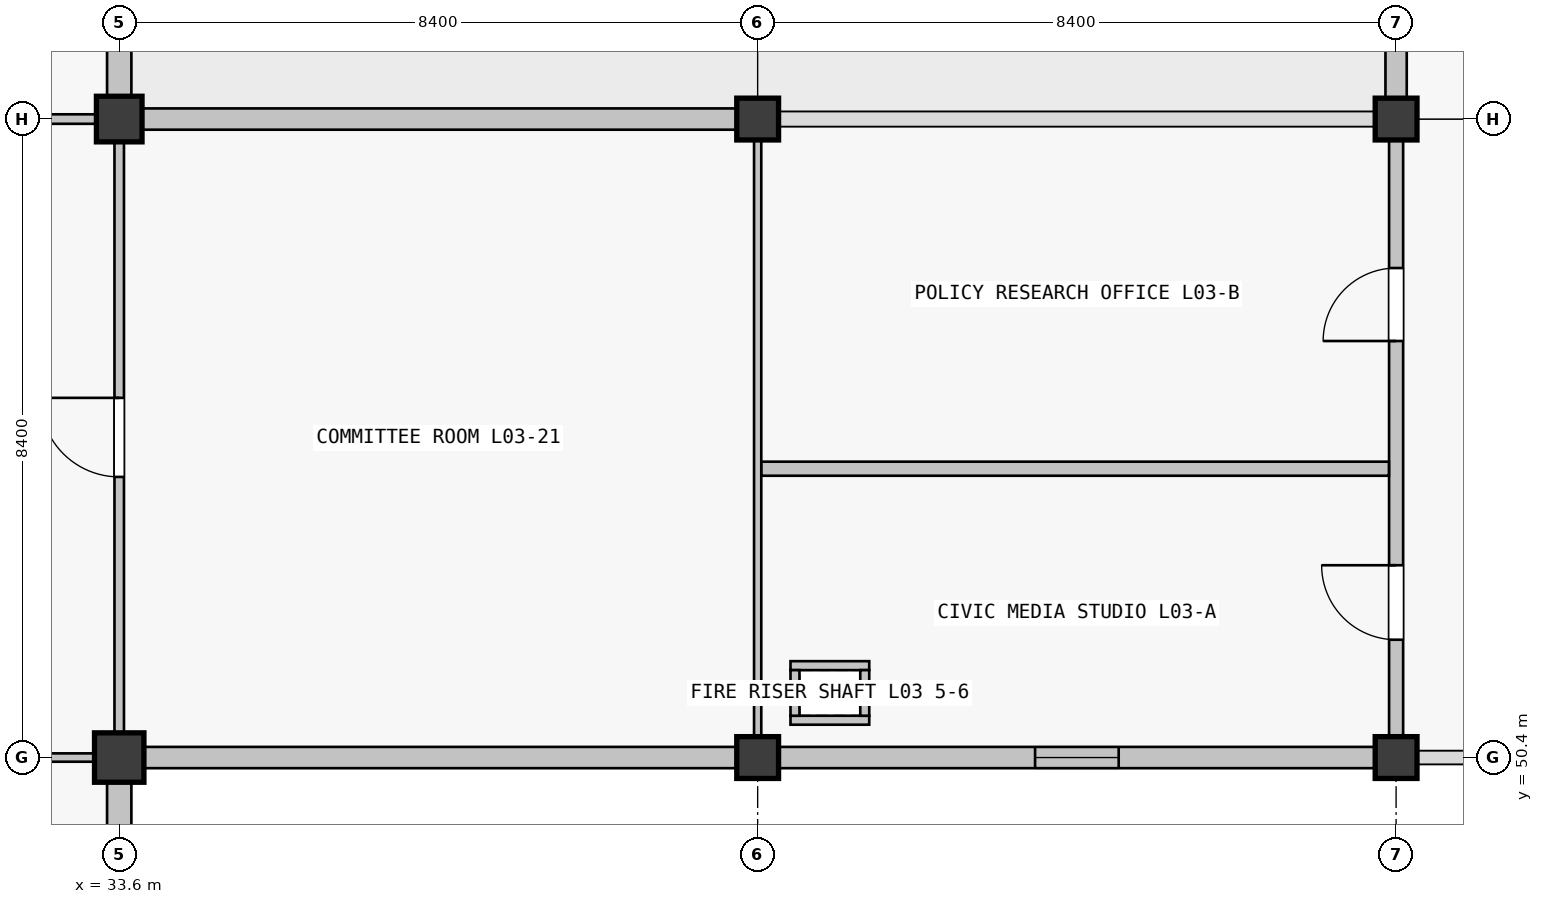
"""IFC4 building model, lengths in metres.
Left out: names, types, materials, properties, quantities, classifications, styles, units other than length and angle.
Written with IfcOpenShell. Run it as: python <this file> out.ifc"""

import sys

from ifc_helpers import new_model, si_unit, direction, frame, frame_2d, origin, origin_2d, place, context, subcontext, project, spatial, rectangle, extrude, element, fill, save


model = new_model("IFC4")
c1 = context("Model", 3, precision=1e-05, world=origin(), true_north=direction((0.0, 1.0)))
c2 = subcontext(c1, "Body", "Model", "MODEL_VIEW")
j1 = project(units=[si_unit("LENGTHUNIT", "METRE"), si_unit("PLANEANGLEUNIT", "RADIAN")], contexts=[c1])
p1 = place(None, origin())
s1 = spatial("IfcSite", under=j1, at=p1, CompositionType="ELEMENT")
p2 = place(p1, origin())
s2 = spatial("IfcBuilding", under=s1, at=p2, CompositionType="ELEMENT")
p3 = place(p2, frame((0.0, 0.0, 14.76)))
s3 = spatial("IfcBuildingStorey", under=s2, at=p3, CompositionType="ELEMENT", Elevation=14.76)
p4 = place(p3, frame((33.6, 50.4, 0.0), z_axis=(0.0, 0.0, 1.0), x_axis=(1.0, 0.0, 0.0)))
e1 = element("IfcColumn", 1, at=p4, inside=s3, PredefinedType="COLUMN", context=c2, shape_type="SweptSolid", body=[
    extrude(rectangle(XDim=0.65, YDim=0.65, at=origin_2d()), origin(), (0.0, 0.0, 1.0), 4.32),
])
p5 = place(p3, frame((33.6, 58.8, 0.0), z_axis=(0.0, 0.0, 1.0), x_axis=(1.0, 0.0, 0.0)))
e2 = element("IfcColumn", 2, at=p5, inside=s3, PredefinedType="COLUMN", context=c2, shape_type="SweptSolid", body=[
    extrude(rectangle(XDim=0.6, YDim=0.6, at=origin_2d()), origin(), (0.0, 0.0, 1.0), 4.32),
])
for number, where, z_axis, x_axis in (
    (3, (42.0, 50.4, 0.0), (0.0, 0.0, 1.0), (1.0, 0.0, 0.0)),
    (4, (42.0, 58.8, 0.0), (0.0, 0.0, 1.0), (1.0, 0.0, 0.0)),
    (5, (50.4, 50.4, 0.0), (0.0, 0.0, 1.0), (1.0, 0.0, 0.0)),
    (6, (50.4, 58.8, 0.0), (0.0, 0.0, 1.0), (1.0, 0.0, 0.0)),
):
    element("IfcColumn", number, at=place(p3, frame(where, z_axis=z_axis, x_axis=x_axis)), inside=s3, PredefinedType="COLUMN", context=c2, shape_type="SweptSolid", body=[
        extrude(rectangle(XDim=0.55, YDim=0.55, at=origin_2d()), origin(), (0.0, 0.0, 1.0), 4.07),
    ])
p6 = place(p3, frame((33.6, 50.074, 0.0), z_axis=(0.0, 0.0, 1.0), x_axis=(0.0, -1.0, 0.0)))
e7 = element("IfcWall", 7, at=p6, inside=s3, PredefinedType="SOLIDWALL", context=c2, shape_type="SweptSolid", body=[
    extrude(rectangle(XDim=7.773, YDim=0.32, at=frame_2d((3.886, 0.0))), origin(), (0.0, 0.0, 1.0), 3.37),
])
p7 = place(p6, frame((3.186, 0.0, 0.9)))
e8 = element("IfcOpeningElement", 8, at=p7, cuts=e7, PredefinedType="OPENING", context=c2, shape_type="SweptSolid", body=[
    extrude(rectangle(XDim=1.4, YDim=1.75, at=frame_2d((0.7, 0.875))), frame((0.0, 0.16, 0.0), z_axis=(0.0, -1.0, 0.0), x_axis=(1.0, 0.0, 0.0)), (0.0, 0.0, 1.0), 0.32),
])
p8 = place(p3, frame((33.6, 66.874, 0.0), z_axis=(0.0, 0.0, 1.0), x_axis=(0.0, -1.0, 0.0)))
e9 = element("IfcWall", 9, at=p8, inside=s3, PredefinedType="SOLIDWALL", context=c2, shape_type="SweptSolid", body=[
    extrude(rectangle(XDim=7.773, YDim=0.32, at=frame_2d((3.886, 0.0))), origin(), (0.0, 0.0, 1.0), 3.37),
])
p9 = place(p8, frame((2.286, 0.0, 0.9)))
e10 = element("IfcOpeningElement", 10, at=p9, cuts=e9, PredefinedType="OPENING", context=c2, shape_type="SweptSolid", body=[
    extrude(rectangle(XDim=3.2, YDim=1.75, at=frame_2d((1.6, 0.875))), frame((0.0, 0.16, 0.0), z_axis=(0.0, -1.0, 0.0), x_axis=(1.0, 0.0, 0.0)), (0.0, 0.0, 1.0), 0.32),
])
p10 = place(p3, frame((41.724, 50.4, 0.0), z_axis=(0.0, 0.0, 1.0), x_axis=(-1.0, 0.0, 0.0)))
e11 = element("IfcWall", 11, at=p10, inside=s3, PredefinedType="SOLIDWALL", context=c2, shape_type="SweptSolid", body=[
    extrude(rectangle(XDim=7.798, YDim=0.28, at=frame_2d((3.899, 0.0))), origin(), (0.0, 0.0, 1.0), 3.37),
])
p11 = place(p3, frame((33.901, 58.8, 0.0), z_axis=(0.0, 0.0, 1.0), x_axis=(1.0, 0.0, 0.0)))
e12 = element("IfcWall", 12, at=p11, inside=s3, PredefinedType="SOLIDWALL", context=c2, shape_type="SweptSolid", body=[
    extrude(rectangle(XDim=7.823, YDim=0.28, at=frame_2d((3.912, 0.0))), origin(), (0.0, 0.0, 1.0), 3.37),
])
p12 = place(p3, frame((50.124, 50.4, 0.0), z_axis=(0.0, 0.0, 1.0), x_axis=(-1.0, 0.0, 0.0)))
e13 = element("IfcWall", 13, at=p12, inside=s3, PredefinedType="SOLIDWALL", context=c2, shape_type="SweptSolid", body=[
    extrude(rectangle(XDim=7.848, YDim=0.28, at=frame_2d((3.924, 0.0))), origin(), (0.0, 0.0, 1.0), 3.37),
])
p13 = place(p12, frame((3.374, 0.0, 0.9)))
e14 = element("IfcOpeningElement", 14, at=p13, cuts=e13, PredefinedType="OPENING", context=c2, shape_type="SweptSolid", body=[
    extrude(rectangle(XDim=1.1, YDim=1.5, at=frame_2d((0.55, 0.75))), frame((0.0, 0.14, 0.0), z_axis=(0.0, -1.0, 0.0), x_axis=(1.0, 0.0, 0.0)), (0.0, 0.0, 1.0), 0.28),
])
p14 = place(p3, frame((50.4, 59.076, 0.0), z_axis=(0.0, 0.0, 1.0), x_axis=(0.0, 1.0, 0.0)))
e15 = element("IfcWall", 15, at=p14, inside=s3, PredefinedType="SOLIDWALL", context=c2, shape_type="SweptSolid", body=[
    extrude(rectangle(XDim=7.798, YDim=0.28, at=frame_2d((3.899, 0.0))), origin(), (0.0, 0.0, 1.0), 3.37),
])
p15 = place(p14, frame((3.149, 0.0, 0.9)))
e16 = element("IfcOpeningElement", 16, at=p15, cuts=e15, PredefinedType="OPENING", context=c2, shape_type="SweptSolid", body=[
    extrude(rectangle(XDim=1.5, YDim=1.2, at=frame_2d((0.75, 0.6))), frame((0.0, 0.14, 0.0), z_axis=(0.0, -1.0, 0.0), x_axis=(1.0, 0.0, 0.0)), (0.0, 0.0, 1.0), 0.28),
])
for number, where, z_axis, x_axis in (
    (17, (42.432, 50.891, 0.0), (0.0, 0.0, 1.0), (1.0, 0.0, 0.0)),
    (18, (42.432, 51.609, 0.0), (0.0, 0.0, 1.0), (1.0, 0.0, 0.0)),
):
    element("IfcWall", number, at=place(p3, frame(where, z_axis=z_axis, x_axis=x_axis)), inside=s3, PredefinedType="PARTITIONING", context=c2, shape_type="SweptSolid", body=[
        extrude(rectangle(XDim=1.036, YDim=0.118, at=frame_2d((0.518, 0.0))), origin(), (0.0, 0.0, 1.0), 3.35),
    ])
for number, where, z_axis, x_axis in (
    (19, (42.491, 50.95, 0.0), (0.0, 0.0, 1.0), (0.0, 1.0, 0.0)),
    (20, (43.409, 50.95, 0.0), (0.0, 0.0, 1.0), (0.0, 1.0, 0.0)),
):
    element("IfcWall", number, at=place(p3, frame(where, z_axis=z_axis, x_axis=x_axis)), inside=s3, PredefinedType="PARTITIONING", context=c2, shape_type="SweptSolid", body=[
        extrude(rectangle(XDim=0.6, YDim=0.118, at=frame_2d((0.3, 0.0))), origin(), (0.0, 0.0, 1.0), 3.35),
    ])
p16 = place(p3, frame((25.502, 50.4, 0.0), z_axis=(0.0, 0.0, 1.0), x_axis=(1.0, 0.0, 0.0)))
e21 = element("IfcWall", 21, at=p16, inside=s3, PredefinedType="MOVABLE", context=c2, shape_type="SweptSolid", body=[
    extrude(rectangle(XDim=7.771, YDim=0.11, at=frame_2d((3.885, 0.0))), origin(), (0.0, 0.0, 1.0), 3.19),
])
p17 = place(p16, frame((3.381, 0.0, 0.0)))
e22 = element("IfcOpeningElement", 22, at=p17, cuts=e21, PredefinedType="OPENING", context=c2, shape_type="SweptSolid", body=[
    extrude(rectangle(XDim=1.01, YDim=2.12, at=frame_2d((0.505, 1.06))), frame((0.0, 0.055, 0.0), z_axis=(0.0, -1.0, 0.0), x_axis=(1.0, 0.0, 0.0)), (0.0, 0.0, 1.0), 0.11),
])
p18 = place(p3, frame((25.527, 58.8, 0.0), z_axis=(0.0, 0.0, 1.0), x_axis=(1.0, 0.0, 0.0)))
e23 = element("IfcWall", 23, at=p18, inside=s3, PredefinedType="PARTITIONING", context=c2, shape_type="SweptSolid", body=[
    extrude(rectangle(XDim=7.771, YDim=0.125, at=frame_2d((3.885, 0.0))), origin(), (0.0, 0.0, 1.0), 3.19),
])
p19 = place(p18, frame((3.401, 0.0, 0.0)))
e24 = element("IfcOpeningElement", 24, at=p19, cuts=e23, PredefinedType="OPENING", context=c2, shape_type="SweptSolid", body=[
    extrude(rectangle(XDim=0.97, YDim=2.12, at=frame_2d((0.485, 1.06))), frame((0.0, 0.062, 0.0), z_axis=(0.0, -1.0, 0.0), x_axis=(1.0, 0.0, 0.0)), (0.0, 0.0, 1.0), 0.125),
])
p20 = place(p3, frame((33.6, 50.727, 0.0), z_axis=(0.0, 0.0, 1.0), x_axis=(0.0, 1.0, 0.0)))
e25 = element("IfcWall", 25, at=p20, inside=s3, PredefinedType="PARTITIONING", context=c2, shape_type="SweptSolid", body=[
    extrude(rectangle(XDim=7.771, YDim=0.125, at=frame_2d((3.885, 0.0))), origin(), (0.0, 0.0, 1.0), 3.19),
])
p21 = place(p20, frame((3.365, 0.0, 0.0)))
e26 = element("IfcOpeningElement", 26, at=p21, cuts=e25, PredefinedType="OPENING", context=c2, shape_type="SweptSolid", body=[
    extrude(rectangle(XDim=1.04, YDim=2.2, at=frame_2d((0.52, 1.1))), frame((0.0, 0.062, 0.0), z_axis=(0.0, -1.0, 0.0), x_axis=(1.0, 0.0, 0.0)), (0.0, 0.0, 1.0), 0.125),
])
p22 = place(p3, frame((42.0, 50.677, 0.0), z_axis=(0.0, 0.0, 1.0), x_axis=(0.0, 1.0, 0.0)))
e27 = element("IfcWall", 27, at=p22, inside=s3, PredefinedType="PARTITIONING", context=c2, shape_type="SweptSolid", body=[
    extrude(rectangle(XDim=7.846, YDim=0.095, at=frame_2d((3.923, 0.0))), origin(), (0.0, 0.0, 1.0), 3.19),
])
p23 = place(p3, frame((50.4, 50.677, 0.0), z_axis=(0.0, 0.0, 1.0), x_axis=(0.0, 1.0, 0.0)))
e28 = element("IfcWall", 28, at=p23, inside=s3, PredefinedType="PARTITIONING", context=c2, shape_type="SweptSolid", body=[
    extrude(rectangle(XDim=7.846, YDim=0.185, at=frame_2d((3.923, 0.0))), origin(), (0.0, 0.0, 1.0), 3.19),
])
p24 = place(p23, frame((1.273, 0.0, 0.0)))
e29 = element("IfcOpeningElement", 29, at=p24, cuts=e28, PredefinedType="OPENING", context=c2, shape_type="SweptSolid", body=[
    extrude(rectangle(XDim=0.98, YDim=2.18, at=frame_2d((0.49, 1.09))), frame((0.0, 0.093, 0.0), z_axis=(0.0, -1.0, 0.0), x_axis=(1.0, 0.0, 0.0)), (0.0, 0.0, 1.0), 0.185),
])
p25 = place(p23, frame((5.203, 0.0, 0.0)))
e30 = element("IfcOpeningElement", 30, at=p25, cuts=e28, PredefinedType="OPENING", context=c2, shape_type="SweptSolid", body=[
    extrude(rectangle(XDim=0.96, YDim=2.18, at=frame_2d((0.48, 1.09))), frame((0.0, 0.093, 0.0), z_axis=(0.0, -1.0, 0.0), x_axis=(1.0, 0.0, 0.0)), (0.0, 0.0, 1.0), 0.185),
])
p26 = place(p3, frame((42.05, 54.2, 0.0), z_axis=(0.0, 0.0, 1.0), x_axis=(1.0, 0.0, 0.0)))
e31 = element("IfcWall", 31, at=p26, inside=s3, PredefinedType="PARTITIONING", context=c2, shape_type="SweptSolid", body=[
    extrude(rectangle(XDim=8.256, YDim=0.185, at=frame_2d((4.128, 0.0))), origin(), (0.0, 0.0, 1.0), 3.19),
])
p27 = place(p13, origin())
e32 = element("IfcWindow", 32, at=p27, inside=s3, PartitioningType="SINGLE_PANEL", PredefinedType="WINDOW", context=c2, shape_type="SweptSolid", body=[
    extrude(rectangle(XDim=1.1, YDim=1.5, at=frame_2d((0.55, 0.75))), frame((0.0, 0.03, 0.0), z_axis=(0.0, -1.0, 0.0), x_axis=(1.0, 0.0, 0.0)), (0.0, 0.0, 1.0), 0.06),
])
fill(e14, e32)
p28 = place(p24, origin())
e33 = element("IfcDoor", 33, at=p28, inside=s3, OperationType="SINGLE_SWING_RIGHT", PredefinedType="DOOR", context=c2, shape_type="SweptSolid", body=[
    extrude(rectangle(XDim=0.98, YDim=2.18, at=frame_2d((0.49, 1.09))), frame((0.0, 0.025, 0.0), z_axis=(0.0, -1.0, 0.0), x_axis=(1.0, 0.0, 0.0)), (0.0, 0.0, 1.0), 0.05),
])
fill(e29, e33)
p29 = place(p25, origin())
e34 = element("IfcDoor", 34, at=p29, inside=s3, OperationType="SINGLE_SWING_LEFT", PredefinedType="DOOR", context=c2, shape_type="SweptSolid", body=[
    extrude(rectangle(XDim=0.96, YDim=2.18, at=frame_2d((0.48, 1.09))), frame((0.0, 0.025, 0.0), z_axis=(0.0, -1.0, 0.0), x_axis=(1.0, 0.0, 0.0)), (0.0, 0.0, 1.0), 0.05),
])
fill(e30, e34)
p30 = place(p21, origin())
e35 = element("IfcDoor", 35, at=p30, inside=s3, OperationType="SINGLE_SWING_RIGHT", PredefinedType="DOOR", context=c2, shape_type="SweptSolid", body=[
    extrude(rectangle(XDim=1.04, YDim=2.2, at=frame_2d((0.52, 1.1))), frame((0.0, 0.025, 0.0), z_axis=(0.0, -1.0, 0.0), x_axis=(1.0, 0.0, 0.0)), (0.0, 0.0, 1.0), 0.05),
])
fill(e26, e35)
save(model, sys.argv[1])
